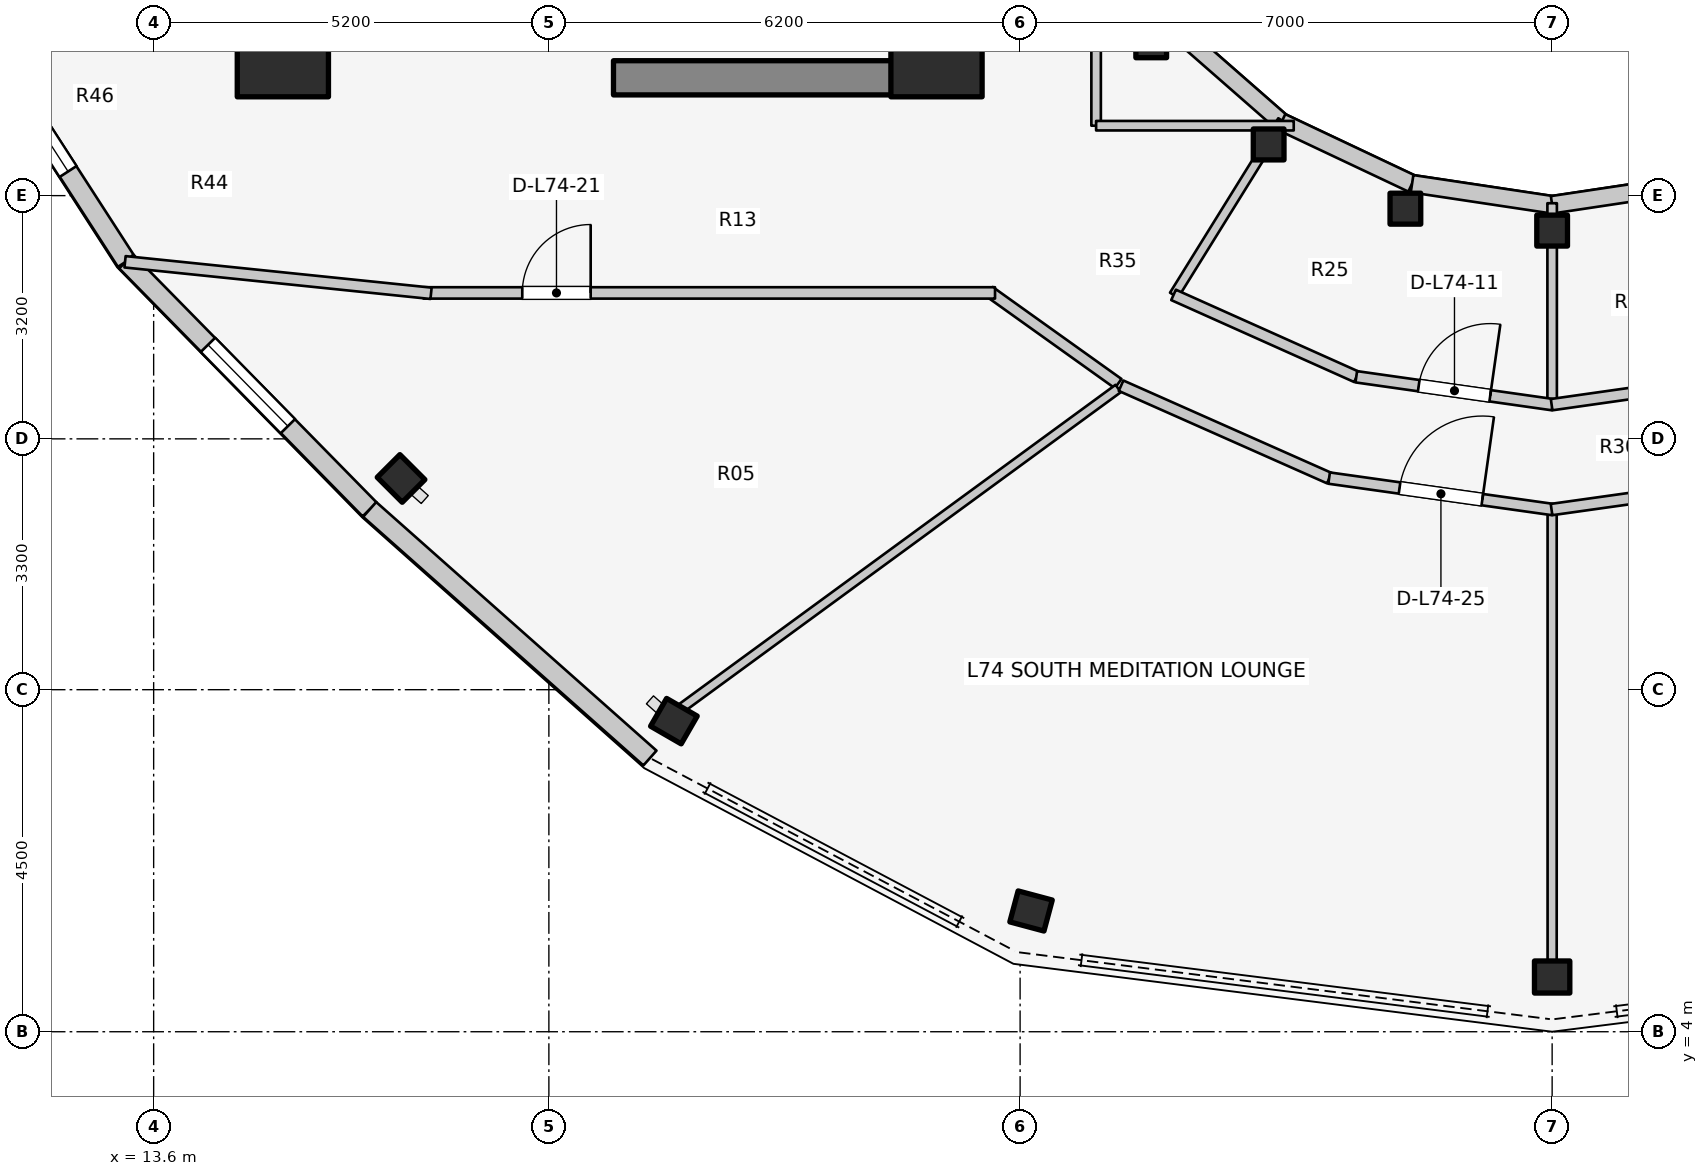
"""IFC4 building model, lengths in metres.
Left out: names, types, materials, properties, quantities, classifications, styles, units other than length and angle.
Written with IfcOpenShell. Run it as: python <this file> out.ifc"""

import sys

from ifc_helpers import new_model, si_unit, direction, frame, frame_2d, origin, origin_2d, place, context, subcontext, project, spatial, rectangle, i_section, extrude, element, fill, save


model = new_model("IFC4")
c1 = context("Model", 3, precision=1e-05, world=origin(), true_north=direction((0.0, 1.0)))
c2 = subcontext(c1, "Body", "Model", "MODEL_VIEW")
j1 = project(units=[si_unit("LENGTHUNIT", "METRE"), si_unit("PLANEANGLEUNIT", "RADIAN")], contexts=[c1])
p1 = place(None, origin())
s1 = spatial("IfcSite", under=j1, at=p1, CompositionType="ELEMENT")
p2 = place(p1, origin())
s2 = spatial("IfcBuilding", under=s1, at=p2, CompositionType="ELEMENT")
p3 = place(p2, frame((0.0, 0.0, 242.4)))
s3 = spatial("IfcBuildingStorey", under=s2, at=p3, CompositionType="ELEMENT", Elevation=242.4)
p4 = place(p3, frame((19.65, 16.55, 0.0), z_axis=(0.0, 0.0, 1.0), x_axis=(1.0, 0.0, 0.0)))
e1 = element("IfcWall", 1, at=p4, inside=s3, PredefinedType="SHEAR", context=c2, shape_type="SweptSolid", body=[
    extrude(rectangle(XDim=4.5, YDim=0.45, at=frame_2d((2.25, 0.0))), origin(), (0.0, 0.0, 1.0), 3.6),
])
for number, where, z_axis, x_axis in (
    (2, (15.3, 16.9, 0.0), (0.0, 0.0, 1.0), (1.0, 0.0, 0.0)),
    (3, (23.9, 16.9, 0.0), (0.0, 0.0, 1.0), (1.0, 0.0, 0.0)),
):
    element("IfcColumn", number, at=place(p3, frame(where, z_axis=z_axis, x_axis=x_axis)), inside=s3, PredefinedType="COLUMN", context=c2, shape_type="SweptSolid", body=[
        extrude(rectangle(XDim=1.2, YDim=1.2, at=origin_2d()), origin(), (0.0, 0.0, 1.0), 3.6),
    ])
p5 = place(p3, frame((26.725, 17.018, 0.0), z_axis=(0.0, 0.0, 1.0), x_axis=(1.0, 0.0, 0.0)))
e4 = element("IfcColumn", 4, at=p5, inside=s3, PredefinedType="COLUMN", context=c2, shape_type="SweptSolid", body=[
    extrude(i_section(OverallWidth=0.404, OverallDepth=0.407, WebThickness=0.027, FlangeThickness=0.044, FilletRadius=0.025, at=origin_2d()), origin(), (0.0, 0.0, 1.0), 3.6),
])
p6 = place(p3, frame((16.855, 11.279, 0.0), z_axis=(0.0, 0.0, 1.0), x_axis=(-0.707106781187, -0.707106781187, 0.0)))
e5 = element("IfcColumn", 5, at=p6, inside=s3, PredefinedType="COLUMN", context=c2, shape_type="SweptSolid", body=[
    extrude(i_section(OverallWidth=0.422, OverallDepth=0.465, WebThickness=0.045, FlangeThickness=0.073, FilletRadius=0.025, at=origin_2d()), origin(), (0.0, 0.0, 1.0), 3.6),
])
p7 = place(p3, frame((28.27, 15.673, 0.0), z_axis=(0.0, 0.0, 1.0), x_axis=(1.0, 0.0, 0.0)))
e6 = element("IfcColumn", 6, at=p7, inside=s3, PredefinedType="COLUMN", context=c2, shape_type="SweptSolid", body=[
    extrude(i_section(OverallWidth=0.404, OverallDepth=0.407, WebThickness=0.027, FlangeThickness=0.044, FilletRadius=0.025, at=origin_2d()), origin(), (0.0, 0.0, 1.0), 3.6),
])
p8 = place(p3, frame((20.445, 8.086, 0.0), z_axis=(0.0, 0.0, 1.0), x_axis=(-0.5, -0.866025403784, 0.0)))
e7 = element("IfcColumn", 7, at=p8, inside=s3, PredefinedType="COLUMN", context=c2, shape_type="SweptSolid", body=[
    extrude(i_section(OverallWidth=0.422, OverallDepth=0.465, WebThickness=0.045, FlangeThickness=0.073, FilletRadius=0.025, at=origin_2d()), origin(), (0.0, 0.0, 1.0), 3.6),
])
p9 = place(p3, frame((30.069, 14.828, 0.0), z_axis=(0.0, 0.0, 1.0), x_axis=(1.0, 0.0, 0.0)))
e8 = element("IfcColumn", 8, at=p9, inside=s3, PredefinedType="COLUMN", context=c2, shape_type="SweptSolid", body=[
    extrude(i_section(OverallWidth=0.404, OverallDepth=0.407, WebThickness=0.027, FlangeThickness=0.044, FilletRadius=0.025, at=origin_2d()), origin(), (0.0, 0.0, 1.0), 3.6),
])
p10 = place(p3, frame((25.144, 5.589, 0.0), z_axis=(0.0, 0.0, 1.0), x_axis=(-0.258819045103, -0.965925826289, 0.0)))
e9 = element("IfcColumn", 9, at=p10, inside=s3, PredefinedType="COLUMN", context=c2, shape_type="SweptSolid", body=[
    extrude(i_section(OverallWidth=0.422, OverallDepth=0.465, WebThickness=0.045, FlangeThickness=0.073, FilletRadius=0.025, at=origin_2d()), origin(), (0.0, 0.0, 1.0), 3.6),
])
p11 = place(p3, frame((32.0, 14.54, 0.0), z_axis=(0.0, 0.0, 1.0), x_axis=(1.0, 0.0, 0.0)))
e10 = element("IfcColumn", 10, at=p11, inside=s3, PredefinedType="COLUMN", context=c2, shape_type="SweptSolid", body=[
    extrude(i_section(OverallWidth=0.404, OverallDepth=0.407, WebThickness=0.027, FlangeThickness=0.044, FilletRadius=0.025, at=origin_2d()), origin(), (0.0, 0.0, 1.0), 3.6),
])
p12 = place(p3, frame((32.0, 4.72, 0.0), z_axis=(0.0, 0.0, 1.0), x_axis=(0.0, -1.0, 0.0)))
e11 = element("IfcColumn", 11, at=p12, inside=s3, PredefinedType="COLUMN", context=c2, shape_type="SweptSolid", body=[
    extrude(i_section(OverallWidth=0.422, OverallDepth=0.465, WebThickness=0.045, FlangeThickness=0.073, FilletRadius=0.025, at=origin_2d()), origin(), (0.0, 0.0, 1.0), 3.6),
])
p13 = place(p3, frame((26.965, 17.258, 0.0), z_axis=(0.0, 0.0, 1.0), x_axis=(0.752576694707, -0.658504607869, 0.0)))
e12 = element("IfcWall", 12, at=p13, inside=s3, PredefinedType="STANDARD", context=c2, shape_type="SweptSolid", body=[
    extrude(rectangle(XDim=1.959, YDim=0.23, at=frame_2d((0.98, 0.0))), origin(), (0.0, 0.0, 1.0), 2.6),
])
p14 = place(p3, frame((28.44, 15.968, 0.0), z_axis=(0.0, 0.0, 1.0), x_axis=(0.904179699603, -0.427152280606, 0.0)))
e13 = element("IfcWall", 13, at=p14, inside=s3, PredefinedType="STANDARD", context=c2, shape_type="SweptSolid", body=[
    extrude(rectangle(XDim=1.899, YDim=0.23, at=frame_2d((0.95, 0.0))), origin(), (0.0, 0.0, 1.0), 2.6),
])
for number, where, z_axis, x_axis in (
    (14, (30.157, 15.157, 0.0), (0.0, 0.0, 1.0), (0.989, -0.149, 0.0)),
    (15, (32.0, 14.88, 0.0), (0.0, 0.0, 1.0), (0.989, 0.149, 0.0)),
):
    element("IfcWall", number, at=place(p3, frame(where, z_axis=z_axis, x_axis=x_axis)), inside=s3, PredefinedType="STANDARD", context=c2, shape_type="SweptSolid", body=[
        extrude(rectangle(XDim=1.864, YDim=0.23, at=frame_2d((0.932, 0.0))), origin(), (0.0, 0.0, 1.0), 2.6),
    ])
p15 = place(p3, frame((10.895, 17.761, 0.0), z_axis=(0.0, 0.0, 1.0), x_axis=(0.542641766008, -0.839964233634, 0.0)))
e16 = element("IfcWall", 16, at=p15, inside=s3, PredefinedType="STANDARD", context=c2, shape_type="SweptSolid", body=[
    extrude(rectangle(XDim=4.319, YDim=0.26, at=frame_2d((2.16, 0.0))), origin(), (0.0, 0.0, 1.0), 3.29),
])
p16 = place(p15, frame((1.41, 0.0, 0.75)))
e17 = element("IfcOpeningElement", 17, at=p16, cuts=e16, PredefinedType="OPENING", context=c2, shape_type="SweptSolid", body=[
    extrude(rectangle(XDim=1.5, YDim=1.6, at=frame_2d((0.75, 0.8))), frame((0.0, 0.14, 0.0), z_axis=(0.0, -1.0, 0.0), x_axis=(1.0, 0.0, 0.0)), (0.0, 0.0, 1.0), 0.28),
])
p17 = place(p3, frame((13.239, 14.133, 0.0), z_axis=(0.0, 0.0, 1.0), x_axis=(0.700642973333, -0.713512034881, 0.0)))
e18 = element("IfcWall", 18, at=p17, inside=s3, PredefinedType="STANDARD", context=c2, shape_type="SweptSolid", body=[
    extrude(rectangle(XDim=4.572, YDim=0.26, at=frame_2d((2.286, 0.0))), origin(), (0.0, 0.0, 1.0), 3.29),
])
p18 = place(p17, frame((1.536, 0.0, 0.75)))
e19 = element("IfcOpeningElement", 19, at=p18, cuts=e18, PredefinedType="OPENING", context=c2, shape_type="SweptSolid", body=[
    extrude(rectangle(XDim=1.5, YDim=1.6, at=frame_2d((0.75, 0.8))), frame((0.0, 0.14, 0.0), z_axis=(0.0, -1.0, 0.0), x_axis=(1.0, 0.0, 0.0)), (0.0, 0.0, 1.0), 0.28),
])
p19 = place(p3, frame((16.442, 10.871, 0.0), z_axis=(0.0, 0.0, 1.0), x_axis=(0.748165854006, -0.663511759428, 0.0)))
e20 = element("IfcWall", 20, at=p19, inside=s3, PredefinedType="STANDARD", context=c2, shape_type="SweptSolid", body=[
    extrude(rectangle(XDim=4.929, YDim=0.26, at=frame_2d((2.464, 0.0))), origin(), (0.0, 0.0, 1.0), 3.29),
])
p20 = place(p3, frame((28.45, 15.985, 0.0), z_axis=(0.0, 0.0, 1.0), x_axis=(-0.527527080983, -0.849538215049, 0.0)))
e21 = element("IfcWall", 21, at=p20, inside=s3, PredefinedType="PARTITIONING", context=c2, shape_type="SweptSolid", body=[
    extrude(rectangle(XDim=2.701, YDim=0.125, at=frame_2d((1.351, 0.0))), origin(), (0.0, 0.0, 1.0), 2.672),
])
p21 = place(p3, frame((32.0, 14.9, 0.0), z_axis=(0.0, 0.0, 1.0), x_axis=(0.0, -1.0, 0.0)))
e22 = element("IfcWall", 22, at=p21, inside=s3, PredefinedType="PARTITIONING", context=c2, shape_type="SweptSolid", body=[
    extrude(rectangle(XDim=2.65, YDim=0.125, at=frame_2d((1.325, 0.0))), origin(), (0.0, 0.0, 1.0), 2.672),
])
p22 = place(p3, frame((27.019, 13.694, 0.0), z_axis=(0.0, 0.0, 1.0), x_axis=(0.912628408652, -0.408790151203, 0.0)))
e23 = element("IfcWall", 23, at=p22, inside=s3, PredefinedType="PARTITIONING", context=c2, shape_type="SweptSolid", body=[
    extrude(rectangle(XDim=2.638, YDim=0.15, at=frame_2d((1.319, 0.0))), origin(), (0.0, 0.0, 1.0), 2.816),
])
p23 = place(p3, frame((29.423, 12.617, 0.0), z_axis=(0.0, 0.0, 1.0), x_axis=(0.990078185178, -0.140517569133, 0.0)))
e24 = element("IfcWall", 24, at=p23, inside=s3, PredefinedType="PARTITIONING", context=c2, shape_type="SweptSolid", body=[
    extrude(rectangle(XDim=2.61, YDim=0.15, at=frame_2d((1.305, 0.0))), origin(), (0.0, 0.0, 1.0), 2.816),
])
p24 = place(p23, frame((0.83, 0.0, 0.0)))
e25 = element("IfcOpeningElement", 25, at=p24, cuts=e24, PredefinedType="OPENING", context=c2, shape_type="SweptSolid", body=[
    extrude(rectangle(XDim=0.95, YDim=2.1, at=frame_2d((0.475, 1.05))), frame((0.0, 0.085, 0.0), z_axis=(0.0, -1.0, 0.0), x_axis=(1.0, 0.0, 0.0)), (0.0, 0.0, 1.0), 0.17),
])
p25 = place(p3, frame((31.993, 12.25, 0.0), z_axis=(0.0, 0.0, 1.0), x_axis=(0.990078185178, 0.140517569133, 0.0)))
e26 = element("IfcWall", 26, at=p25, inside=s3, PredefinedType="PARTITIONING", context=c2, shape_type="SweptSolid", body=[
    extrude(rectangle(XDim=2.61, YDim=0.15, at=frame_2d((1.305, 0.0))), origin(), (0.0, 0.0, 1.0), 2.816),
])
p26 = place(p3, frame((26.0, 15.92, 0.0), z_axis=(0.0, 0.0, 1.0), x_axis=(0.0, 1.0, 0.0)))
e27 = element("IfcWall", 27, at=p26, inside=s3, PredefinedType="PARTITIONING", context=c2, shape_type="SweptSolid", body=[
    extrude(rectangle(XDim=4.28, YDim=0.125, at=frame_2d((2.14, 0.0))), origin(), (0.0, 0.0, 1.0), 2.672),
])
p27 = place(p3, frame((26.0, 15.92, 0.0), z_axis=(0.0, 0.0, 1.0), x_axis=(1.0, 0.0, 0.0)))
e28 = element("IfcWall", 28, at=p27, inside=s3, PredefinedType="PARTITIONING", context=c2, shape_type="SweptSolid", body=[
    extrude(rectangle(XDim=2.6, YDim=0.125, at=frame_2d((1.3, 0.0))), origin(), (0.0, 0.0, 1.0), 2.672),
])
p28 = place(p3, frame((26.29, 12.527, 0.0), z_axis=(0.0, 0.0, 1.0), x_axis=(-0.813780999276, 0.581171648669, 0.0)))
e29 = element("IfcWall", 29, at=p28, inside=s3, PredefinedType="PARTITIONING", context=c2, shape_type="SweptSolid", body=[
    extrude(rectangle(XDim=2.082, YDim=0.15, at=frame_2d((1.041, 0.0))), origin(), (0.0, 0.0, 1.0), 2.816),
])
p29 = place(p3, frame((17.15, 13.72, 0.0), z_axis=(0.0, 0.0, 1.0), x_axis=(1.0, 0.0, 0.0)))
e30 = element("IfcWall", 30, at=p29, inside=s3, PredefinedType="PARTITIONING", context=c2, shape_type="SweptSolid", body=[
    extrude(rectangle(XDim=7.52, YDim=0.15, at=frame_2d((3.76, 0.0))), origin(), (0.0, 0.0, 1.0), 2.816),
])
p30 = place(p29, frame((1.3, 0.0, 0.0)))
e31 = element("IfcOpeningElement", 31, at=p30, cuts=e30, PredefinedType="OPENING", context=c2, shape_type="SweptSolid", body=[
    extrude(rectangle(XDim=0.9, YDim=2.1, at=frame_2d((0.45, 1.05))), frame((0.0, 0.085, 0.0), z_axis=(0.0, -1.0, 0.0), x_axis=(1.0, 0.0, 0.0)), (0.0, 0.0, 1.0), 0.17),
])
p31 = place(p3, frame((17.25, 13.715, 0.0), z_axis=(0.0, 0.0, 1.0), x_axis=(-0.994734711466, 0.102483431859, 0.0)))
e32 = element("IfcWall", 32, at=p31, inside=s3, PredefinedType="PARTITIONING", context=c2, shape_type="SweptSolid", body=[
    extrude(rectangle(XDim=4.047, YDim=0.15, at=frame_2d((2.024, 0.0))), origin(), (0.0, 0.0, 1.0), 2.66),
])
p32 = place(p3, frame((26.291, 12.463, 0.0), z_axis=(0.0, 0.0, 1.0), x_axis=(-0.807095694912, -0.590420646027, 0.0)))
e33 = element("IfcWall", 33, at=p32, inside=s3, PredefinedType="MOVABLE", context=c2, shape_type="SweptSolid", body=[
    extrude(rectangle(XDim=7.119, YDim=0.12, at=frame_2d((3.56, 0.0))), origin(), (0.0, 0.0, 1.0), 2.66),
])
p33 = place(p3, frame((32.0, 10.815, 0.0), z_axis=(0.0, 0.0, 1.0), x_axis=(0.0, -1.0, 0.0)))
e34 = element("IfcWall", 34, at=p33, inside=s3, PredefinedType="MOVABLE", context=c2, shape_type="SweptSolid", body=[
    extrude(rectangle(XDim=5.895, YDim=0.12, at=frame_2d((2.948, 0.0))), origin(), (0.0, 0.0, 1.0), 2.66),
])
p34 = place(p3, frame((26.328, 12.499, 0.0), z_axis=(0.0, 0.0, 1.0), x_axis=(0.914043013008, -0.4056172708, 0.0)))
e35 = element("IfcWall", 35, at=p34, inside=s3, PredefinedType="PARTITIONING", context=c2, shape_type="SweptSolid", body=[
    extrude(rectangle(XDim=2.999, YDim=0.15, at=frame_2d((1.5, 0.0))), origin(), (0.0, 0.0, 1.0), 2.816),
])
p35 = place(p3, frame((29.066, 11.284, 0.0), z_axis=(0.0, 0.0, 1.0), x_axis=(0.990252860391, -0.139281271128, 0.0)))
e36 = element("IfcWall", 36, at=p35, inside=s3, PredefinedType="PARTITIONING", context=c2, shape_type="SweptSolid", body=[
    extrude(rectangle(XDim=2.971, YDim=0.15, at=frame_2d((1.486, 0.0))), origin(), (0.0, 0.0, 1.0), 2.816),
])
p36 = place(p35, frame((0.936, 0.0, 0.0)))
e37 = element("IfcOpeningElement", 37, at=p36, cuts=e36, PredefinedType="OPENING", context=c2, shape_type="SweptSolid", body=[
    extrude(rectangle(XDim=1.1, YDim=2.1, at=frame_2d((0.55, 1.05))), frame((0.0, 0.085, 0.0), z_axis=(0.0, -1.0, 0.0), x_axis=(1.0, 0.0, 0.0)), (0.0, 0.0, 1.0), 0.17),
])
p37 = place(p3, frame((31.992, 10.87, 0.0), z_axis=(0.0, 0.0, 1.0), x_axis=(0.990252860391, 0.139281271128, 0.0)))
e38 = element("IfcWall", 38, at=p37, inside=s3, PredefinedType="PARTITIONING", context=c2, shape_type="SweptSolid", body=[
    extrude(rectangle(XDim=2.971, YDim=0.15, at=frame_2d((1.486, 0.0))), origin(), (0.0, 0.0, 1.0), 2.816),
])
p38 = place(p16, origin())
e39 = element("IfcWindow", 39, at=p38, inside=s3, PartitioningType="SINGLE_PANEL", PredefinedType="WINDOW", context=c2, shape_type="SweptSolid", body=[
    extrude(rectangle(XDim=1.5, YDim=1.6, at=frame_2d((0.75, 0.8))), frame((0.0, 0.03, 0.0), z_axis=(0.0, -1.0, 0.0), x_axis=(1.0, 0.0, 0.0)), (0.0, 0.0, 1.0), 0.06),
])
fill(e17, e39)
p39 = place(p18, origin())
e40 = element("IfcWindow", 40, at=p39, inside=s3, PartitioningType="SINGLE_PANEL", PredefinedType="WINDOW", context=c2, shape_type="SweptSolid", body=[
    extrude(rectangle(XDim=1.5, YDim=1.6, at=frame_2d((0.75, 0.8))), frame((0.0, 0.03, 0.0), z_axis=(0.0, -1.0, 0.0), x_axis=(1.0, 0.0, 0.0)), (0.0, 0.0, 1.0), 0.06),
])
fill(e19, e40)
p40 = place(p24, origin())
e41 = element("IfcDoor", 41, at=p40, inside=s3, OperationType="SINGLE_SWING_RIGHT", PredefinedType="DOOR", context=c2, shape_type="SweptSolid", body=[
    extrude(rectangle(XDim=0.95, YDim=2.1, at=frame_2d((0.475, 1.05))), frame((0.0, 0.025, 0.0), z_axis=(0.0, -1.0, 0.0), x_axis=(1.0, 0.0, 0.0)), (0.0, 0.0, 1.0), 0.05),
])
fill(e25, e41)
p41 = place(p30, origin())
e42 = element("IfcDoor", 42, at=p41, inside=s3, OperationType="SINGLE_SWING_RIGHT", PredefinedType="DOOR", context=c2, shape_type="SweptSolid", body=[
    extrude(rectangle(XDim=0.9, YDim=2.1, at=frame_2d((0.45, 1.05))), frame((0.0, 0.025, 0.0), z_axis=(0.0, -1.0, 0.0), x_axis=(1.0, 0.0, 0.0)), (0.0, 0.0, 1.0), 0.05),
])
fill(e31, e42)
p42 = place(p36, origin())
e43 = element("IfcDoor", 43, at=p42, inside=s3, OperationType="SINGLE_SWING_RIGHT", PredefinedType="DOOR", context=c2, shape_type="SweptSolid", body=[
    extrude(rectangle(XDim=1.1, YDim=2.1, at=frame_2d((0.55, 1.05))), frame((0.0, 0.025, 0.0), z_axis=(0.0, -1.0, 0.0), x_axis=(1.0, 0.0, 0.0)), (0.0, 0.0, 1.0), 0.05),
])
fill(e37, e43)
save(model, sys.argv[1])
